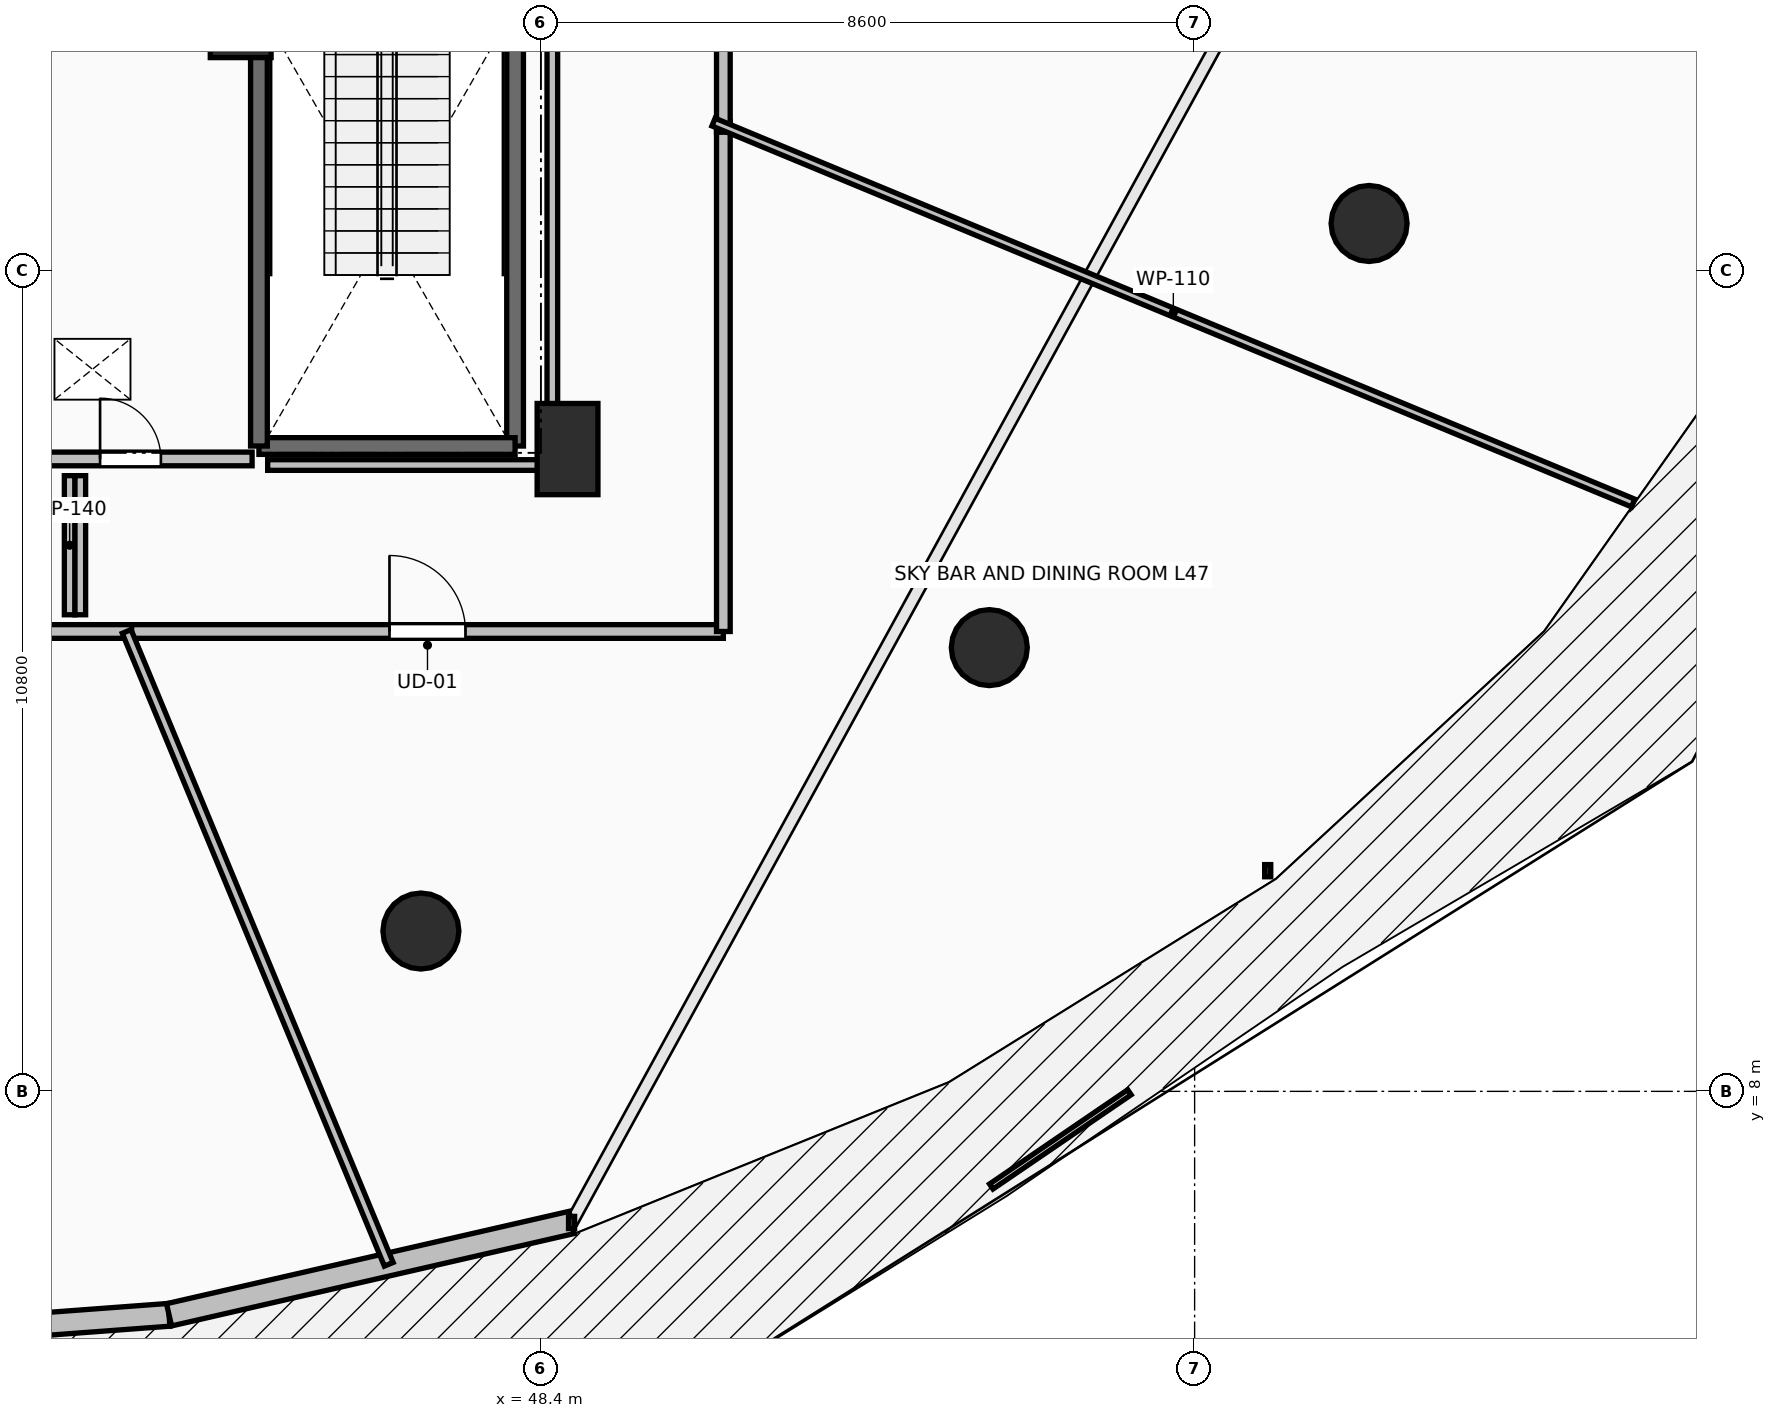
"""IFC4 building model, lengths in metres.
Left out: names, types, materials, properties, quantities, classifications, styles, units other than length and angle.
Written with IfcOpenShell. Run it as: python <this file> out.ifc"""

import sys

from ifc_helpers import new_model, si_unit, direction, frame, frame_2d, origin, origin_2d, place, context, subcontext, project, spatial, rectangle, circle, extrude, element, fill, save


model = new_model("IFC4")
c1 = context("Model", 3, precision=1e-05, world=origin(), true_north=direction((0.0, 1.0)))
c2 = subcontext(c1, "Body", "Model", "MODEL_VIEW")
j1 = project(units=[si_unit("LENGTHUNIT", "METRE"), si_unit("PLANEANGLEUNIT", "RADIAN")], contexts=[c1])
p1 = place(None, origin())
s1 = spatial("IfcSite", under=j1, at=p1, CompositionType="ELEMENT")
p2 = place(p1, origin())
s2 = spatial("IfcBuilding", under=s1, at=p2, CompositionType="ELEMENT")
p3 = place(p2, frame((0.0, 0.0, 174.6)))
s3 = spatial("IfcBuildingStorey", under=s2, at=p3, CompositionType="ELEMENT", Elevation=174.6)
for number, where, z_axis, x_axis in (
    (1, (46.821, 10.109, 0.0), (0.0, 0.0, 1.0), (0.383, -0.924, 0.0)),
    (2, (54.299, 13.838, 0.0), (0.0, 0.0, 1.0), (0.707, -0.707, 0.0)),
    (3, (59.295, 19.418, 0.0), (0.0, 0.0, 1.0), (0.924, -0.383, 0.0)),
):
    element("IfcColumn", number, at=place(p3, frame(where, z_axis=z_axis, x_axis=x_axis)), inside=s3, PredefinedType="COLUMN", context=c2, shape_type="SweptSolid", body=[
        extrude(circle(Radius=0.5, at=origin_2d()), origin(), (0.0, 0.0, 1.0), 4.5),
    ])
for number, where, z_axis, x_axis in (
    (4, (48.75, 16.45, 0.0), (0.0, 0.0, 1.0), (1.0, 0.0, 0.0)),
    (5, (44.45, 22.2, 0.0), (0.0, 0.0, 1.0), (1.0, 0.0, 0.0)),
):
    element("IfcColumn", number, at=place(p3, frame(where, z_axis=z_axis, x_axis=x_axis)), inside=s3, PredefinedType="PILASTER", context=c2, shape_type="SweptSolid", body=[
        extrude(rectangle(XDim=0.8, YDim=1.2, at=origin_2d()), origin(), (0.0, 0.0, 1.0), 4.5),
    ])
p4 = place(p3, frame((38.0, 4.65, 0.0), z_axis=(0.0, 0.0, 1.0), x_axis=(0.997234968529, 0.074312970214, 0.0)))
e6 = element("IfcWall", 6, at=p4, inside=s3, PredefinedType="STANDARD", context=c2, shape_type="SweptSolid", body=[
    extrude(rectangle(XDim=5.523, YDim=0.3, at=frame_2d((2.761, 0.0))), origin(), (0.0, 0.0, 1.0), 4.24),
])
p5 = place(p4, frame((1.961, 0.0, 0.0)))
e7 = element("IfcOpeningElement", 7, at=p5, cuts=e6, PredefinedType="OPENING", context=c2, shape_type="SweptSolid", body=[
    extrude(rectangle(XDim=1.6, YDim=2.3, at=frame_2d((0.8, 1.15))), frame((0.0, 0.165, 0.0), z_axis=(0.0, -1.0, 0.0), x_axis=(1.0, 0.0, 0.0)), (0.0, 0.0, 1.0), 0.33),
])
p6 = place(p3, frame((43.507, 5.06, 0.0), z_axis=(0.0, 0.0, 1.0), x_axis=(0.974684194578, 0.223586047954, 0.0)))
e8 = element("IfcWall", 8, at=p6, inside=s3, PredefinedType="STANDARD", context=c2, shape_type="SweptSolid", body=[
    extrude(rectangle(XDim=5.433, YDim=0.3, at=frame_2d((2.717, 0.0))), origin(), (0.0, 0.0, 1.0), 4.24),
])
p7 = place(p3, frame((48.06, 23.91, 0.0), z_axis=(0.0, 0.0, 1.0), x_axis=(0.0, -1.0, 0.0)))
e9 = element("IfcWall", 9, at=p7, inside=s3, PredefinedType="SOLIDWALL", context=c2, shape_type="SweptSolid", body=[
    extrude(rectangle(XDim=7.42, YDim=0.22, at=frame_2d((3.71, 0.0))), origin(), (0.0, 0.0, 1.0), 4.24),
])
p8 = place(p3, frame((48.06, 16.49, 0.0), z_axis=(0.0, 0.0, 1.0), x_axis=(-1.0, 0.0, 0.0)))
e10 = element("IfcWall", 10, at=p8, inside=s3, PredefinedType="SOLIDWALL", context=c2, shape_type="SweptSolid", body=[
    extrude(rectangle(XDim=3.37, YDim=0.22, at=frame_2d((1.685, 0.0))), origin(), (0.0, 0.0, 1.0), 4.24),
])
p9 = place(p3, frame((44.69, 16.49, 0.0), z_axis=(0.0, 0.0, 1.0), x_axis=(0.0, 1.0, 0.0)))
e11 = element("IfcWall", 11, at=p9, inside=s3, PredefinedType="SOLIDWALL", context=c2, shape_type="SweptSolid", body=[
    extrude(rectangle(XDim=7.42, YDim=0.22, at=frame_2d((3.71, 0.0))), origin(), (0.0, 0.0, 1.0), 4.24),
])
p10 = place(p3, frame((41.4, 16.32, 0.0), z_axis=(0.0, 0.0, 1.0), x_axis=(1.0, 0.0, 0.0)))
e12 = element("IfcWall", 12, at=p10, inside=s3, PredefinedType="PARTITIONING", context=c2, shape_type="SweptSolid", body=[
    extrude(rectangle(XDim=3.2, YDim=0.18, at=frame_2d((1.6, 0.0))), origin(), (0.0, 0.0, 1.0), 4.24),
])
p11 = place(p10, frame((1.2, 0.0, 0.0)))
e13 = element("IfcOpeningElement", 13, at=p11, cuts=e12, PredefinedType="OPENING", context=c2, shape_type="SweptSolid", body=[
    extrude(rectangle(XDim=0.8, YDim=2.05, at=frame_2d((0.4, 1.025))), frame((0.0, 0.105, 0.0), z_axis=(0.0, -1.0, 0.0), x_axis=(1.0, 0.0, 0.0)), (0.0, 0.0, 1.0), 0.21),
])
p12 = place(p3, frame((26.11, 14.05, 0.0), z_axis=(0.0, 0.0, 1.0), x_axis=(1.0, 0.0, 0.0)))
e14 = element("IfcWall", 14, at=p12, inside=s3, PredefinedType="PARTITIONING", context=c2, shape_type="SweptSolid", body=[
    extrude(rectangle(XDim=16.905, YDim=0.18, at=frame_2d((8.452, 0.0))), origin(), (0.0, 0.0, 1.0), 3.432),
])
p13 = place(p12, frame((7.952, 0.0, 0.0)))
e15 = element("IfcOpeningElement", 15, at=p13, cuts=e14, PredefinedType="OPENING", context=c2, shape_type="SweptSolid", body=[
    extrude(rectangle(XDim=1.0, YDim=2.15, at=frame_2d((0.5, 1.075))), frame((0.0, 0.105, 0.0), z_axis=(0.0, -1.0, 0.0), x_axis=(1.0, 0.0, 0.0)), (0.0, 0.0, 1.0), 0.21),
])
p14 = place(p3, frame((43.015, 14.05, 0.0), z_axis=(0.0, 0.0, 1.0), x_axis=(1.0, 0.0, 0.0)))
e16 = element("IfcWall", 16, at=p14, inside=s3, PredefinedType="PARTITIONING", context=c2, shape_type="SweptSolid", body=[
    extrude(rectangle(XDim=7.785, YDim=0.18, at=frame_2d((3.893, 0.0))), origin(), (0.0, 0.0, 1.0), 3.432),
])
p15 = place(p14, frame((3.393, 0.0, 0.0)))
e17 = element("IfcOpeningElement", 17, at=p15, cuts=e16, PredefinedType="OPENING", context=c2, shape_type="SweptSolid", body=[
    extrude(rectangle(XDim=1.0, YDim=2.15, at=frame_2d((0.5, 1.075))), frame((0.0, 0.105, 0.0), z_axis=(0.0, -1.0, 0.0), x_axis=(1.0, 0.0, 0.0)), (0.0, 0.0, 1.0), 0.21),
])
p16 = place(p3, frame((50.8, 14.05, 0.0), z_axis=(0.0, 0.0, 1.0), x_axis=(0.0, 1.0, 0.0)))
e18 = element("IfcWall", 18, at=p16, inside=s3, PredefinedType="PARTITIONING", context=c2, shape_type="SweptSolid", body=[
    extrude(rectangle(XDim=6.708, YDim=0.18, at=frame_2d((3.354, 0.0))), origin(), (0.0, 0.0, 1.0), 3.432),
])
p17 = place(p3, frame((50.8, 20.618, 0.0), z_axis=(0.0, 0.0, 1.0), x_axis=(0.0, 1.0, 0.0)))
e19 = element("IfcWall", 19, at=p17, inside=s3, PredefinedType="PARTITIONING", context=c2, shape_type="SweptSolid", body=[
    extrude(rectangle(XDim=4.072, YDim=0.18, at=frame_2d((2.036, 0.0))), origin(), (0.0, 0.0, 1.0), 4.24),
])
p18 = place(p3, frame((46.398, 5.725, 0.0), z_axis=(0.0, 0.0, 1.0), x_axis=(-0.382654101666, 0.923891681139, 0.0)))
e20 = element("IfcWall", 20, at=p18, inside=s3, PredefinedType="PARTITIONING", context=c2, shape_type="SweptSolid", body=[
    extrude(rectangle(XDim=9.011, YDim=0.125, at=frame_2d((4.505, 0.0))), origin(), (0.0, 0.0, 1.0), 3.432),
])
p19 = place(p3, frame((62.769, 15.74, 0.0), z_axis=(0.0, 0.0, 1.0), x_axis=(-0.923884589978, 0.382671222332, 0.0)))
e21 = element("IfcWall", 21, at=p19, inside=s3, PredefinedType="PARTITIONING", context=c2, shape_type="SweptSolid", body=[
    extrude(rectangle(XDim=13.095, YDim=0.11, at=frame_2d((6.548, 0.0))), origin(), (0.0, 0.0, 1.0), 3.728),
])
p20 = place(p3, frame((48.55, 16.24, 0.0), z_axis=(0.0, 0.0, 1.0), x_axis=(0.0, 1.0, 0.0)))
e22 = element("IfcWall", 22, at=p20, inside=s3, PredefinedType="PARTITIONING", context=c2, shape_type="SweptSolid", body=[
    extrude(rectangle(XDim=7.514, YDim=0.14, at=frame_2d((3.757, 0.0))), origin(), (0.0, 0.0, 1.0), 3.432),
])
for number, where, z_axis, x_axis in (
    (23, (42.2, 16.1, 0.0), (0.0, 0.0, 1.0), (0.0, -1.0, 0.0)),
    (24, (42.34, 14.27, 0.0), (0.0, 0.0, 1.0), (0.0, 1.0, 0.0)),
):
    element("IfcWall", number, at=place(p3, frame(where, z_axis=z_axis, x_axis=x_axis)), inside=s3, PredefinedType="PARTITIONING", context=c2, shape_type="SweptSolid", body=[
        extrude(rectangle(XDim=1.83, YDim=0.14, at=frame_2d((0.915, 0.0))), origin(), (0.0, 0.0, 1.0), 3.929),
    ])
p21 = place(p3, frame((44.805, 16.24, 0.0), z_axis=(0.0, 0.0, 1.0), x_axis=(1.0, 0.0, 0.0)))
e25 = element("IfcWall", 25, at=p21, inside=s3, PredefinedType="PARTITIONING", context=c2, shape_type="SweptSolid", body=[
    extrude(rectangle(XDim=3.745, YDim=0.14, at=frame_2d((1.873, 0.0))), origin(), (0.0, 0.0, 1.0), 3.432),
])
p22 = place(p11, origin())
e26 = element("IfcDoor", 26, at=p22, inside=s3, OperationType="SINGLE_SWING_LEFT", PredefinedType="DOOR", context=c2, shape_type="SweptSolid", body=[
    extrude(rectangle(XDim=0.8, YDim=2.05, at=frame_2d((0.4, 1.025))), frame((0.0, 0.025, 0.0), z_axis=(0.0, -1.0, 0.0), x_axis=(1.0, 0.0, 0.0)), (0.0, 0.0, 1.0), 0.05),
])
fill(e13, e26)
p23 = place(p15, origin())
e27 = element("IfcDoor", 27, at=p23, inside=s3, OperationType="SINGLE_SWING_LEFT", PredefinedType="DOOR", context=c2, shape_type="SweptSolid", body=[
    extrude(rectangle(XDim=1.0, YDim=2.15, at=frame_2d((0.5, 1.075))), frame((0.0, 0.025, 0.0), z_axis=(0.0, -1.0, 0.0), x_axis=(1.0, 0.0, 0.0)), (0.0, 0.0, 1.0), 0.05),
])
fill(e17, e27)
save(model, sys.argv[1])
